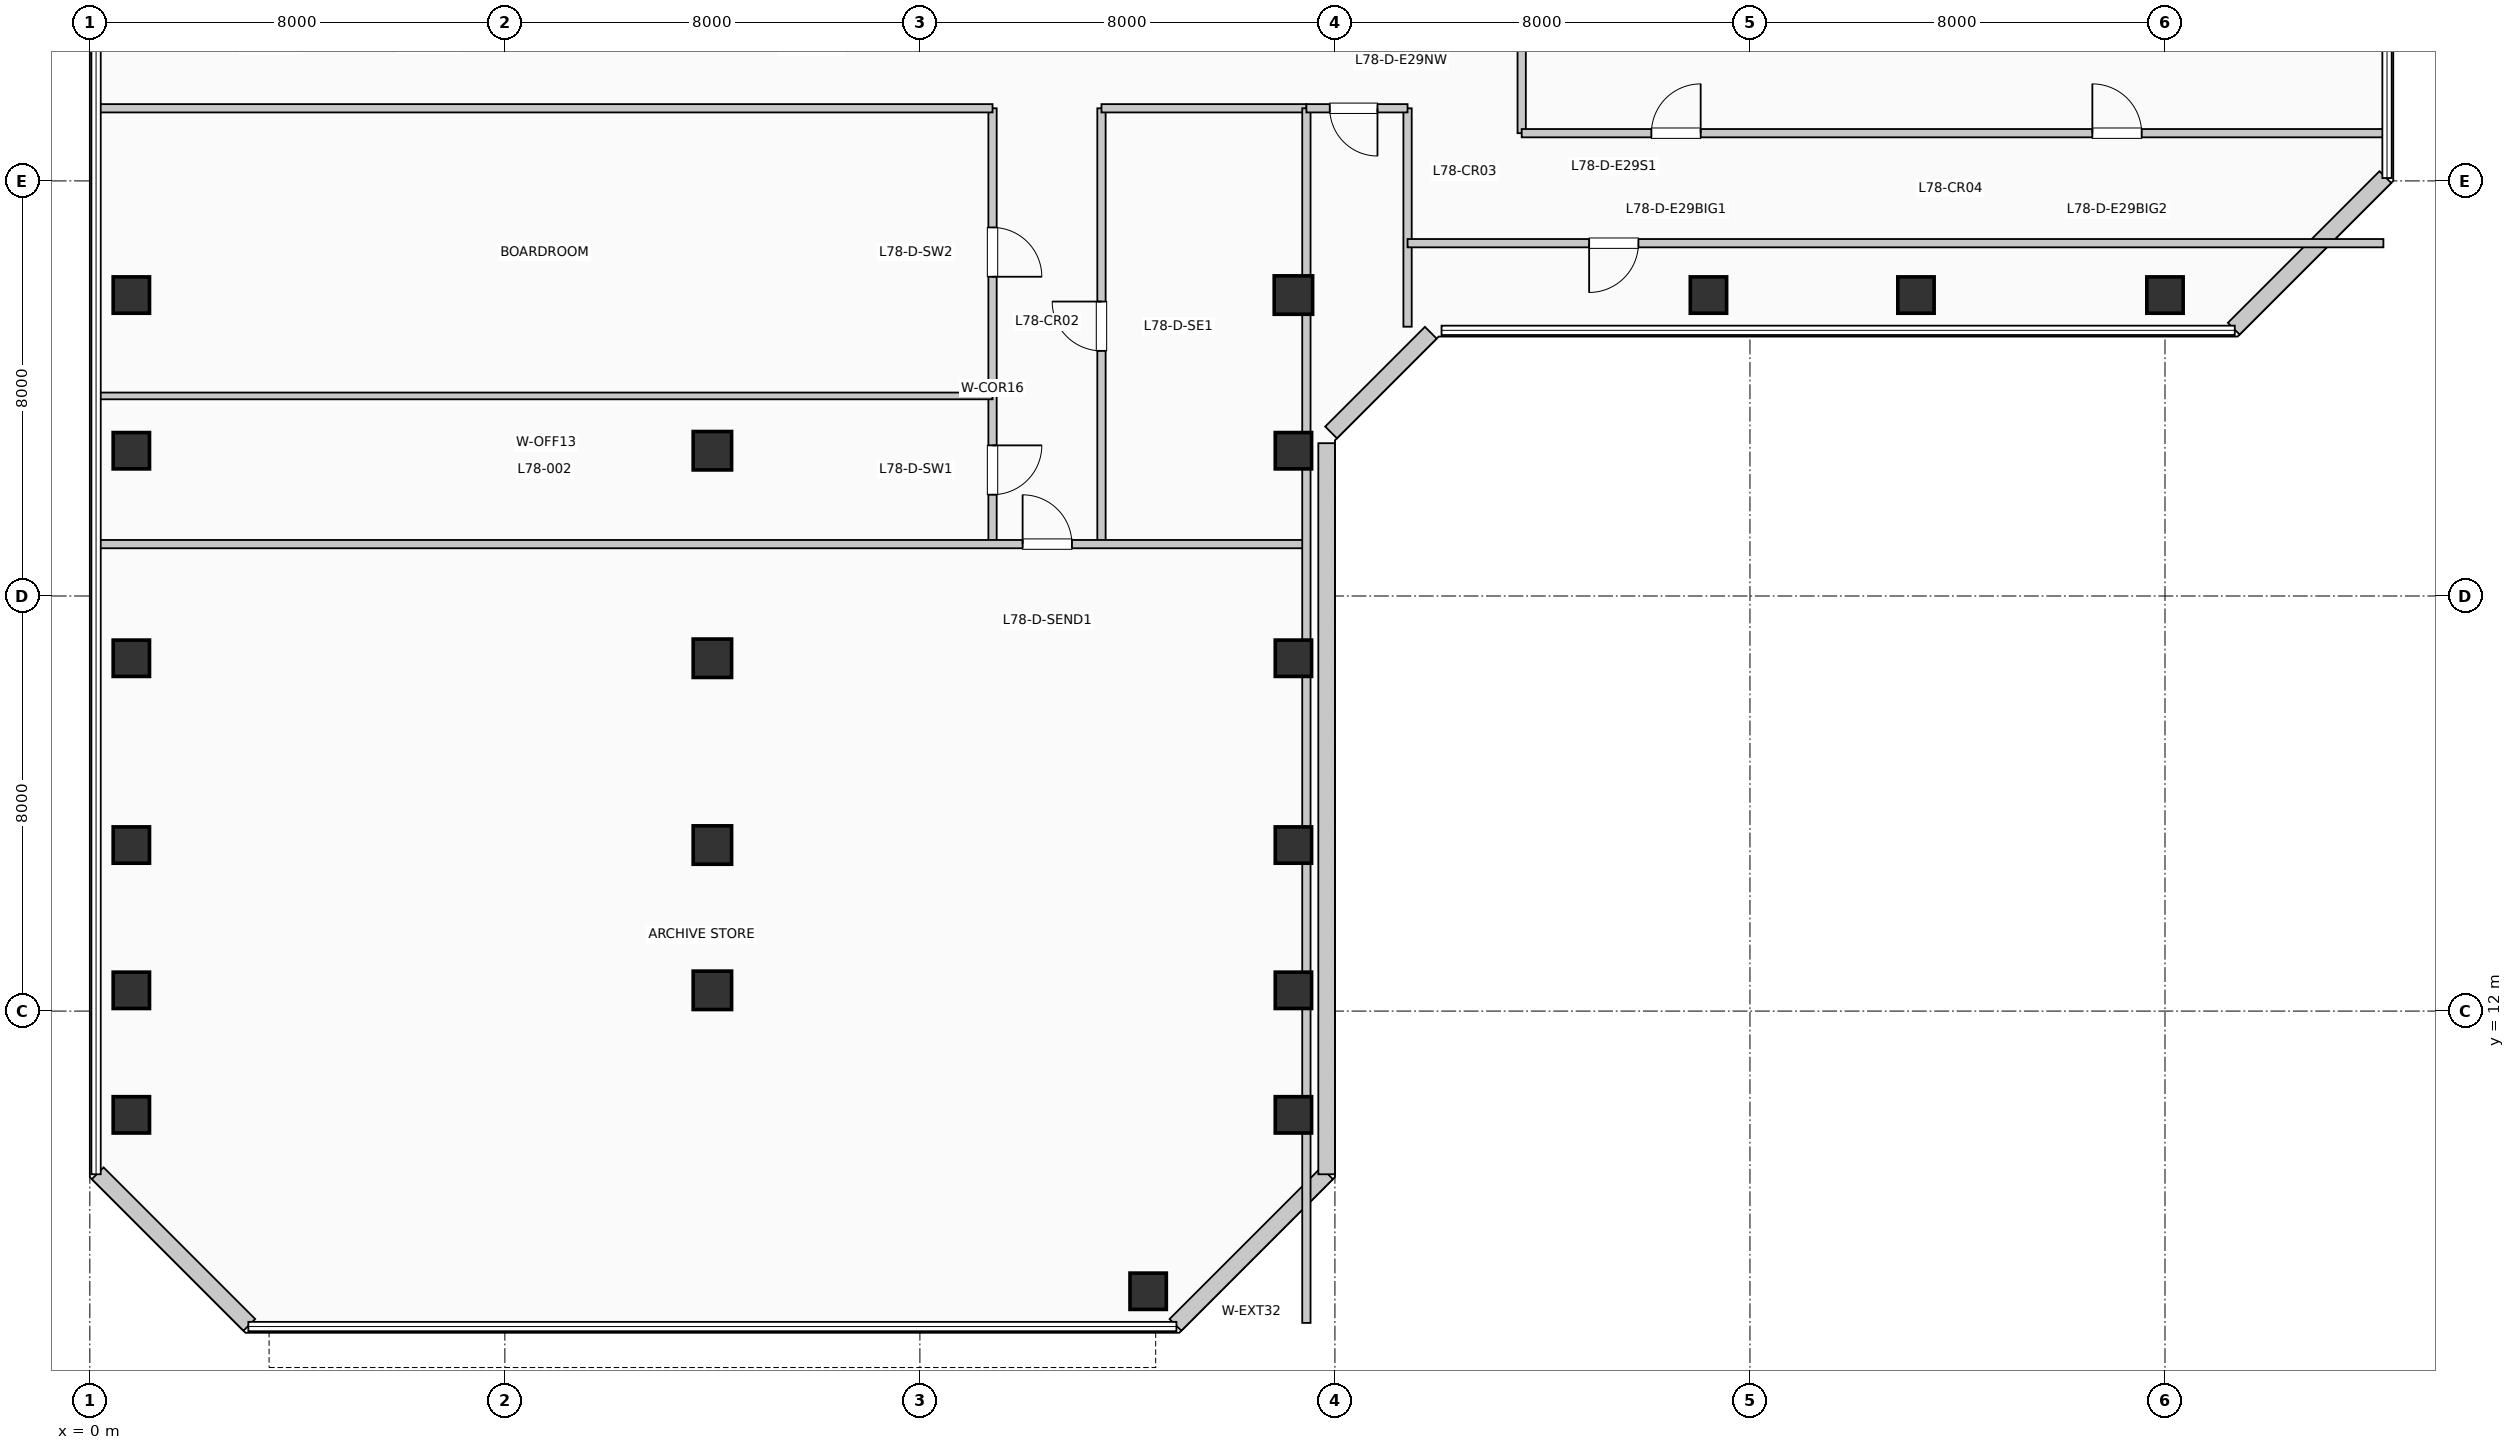
"""IFC4 building model, lengths in metres.
Left out: names, types, materials, properties, quantities, classifications, styles, units other than length and angle.
Written with IfcOpenShell. Run it as: python <this file> out.ifc"""

import sys

from ifc_helpers import new_model, si_unit, direction, frame, frame_2d, origin, origin_2d, place, context, subcontext, project, spatial, rectangle, extrude, element, fill, save


model = new_model("IFC4")
c1 = context("Model", 3, precision=1e-05, world=origin(), true_north=direction((0.0, 1.0)))
c2 = subcontext(c1, "Body", "Model", "MODEL_VIEW")
j1 = project(units=[si_unit("LENGTHUNIT", "METRE"), si_unit("PLANEANGLEUNIT", "RADIAN")], contexts=[c1])
p1 = place(None, origin())
s1 = spatial("IfcSite", under=j1, at=p1, CompositionType="ELEMENT")
p2 = place(p1, origin())
s2 = spatial("IfcBuilding", under=s1, at=p2, CompositionType="ELEMENT")
p3 = place(p2, frame((0.0, 0.0, 319.77)))
s3 = spatial("IfcBuildingStorey", under=s2, at=p3, CompositionType="ELEMENT", Elevation=319.77)
for number, where, z_axis, x_axis in (
    (1, (0.8, 10.0, 0.0), (0.0, 0.0, 1.0), (1.0, 0.0, 0.0)),
    (2, (0.8, 12.4, 0.0), (0.0, 0.0, 1.0), (1.0, 0.0, 0.0)),
    (3, (0.8, 15.2, 0.0), (0.0, 0.0, 1.0), (1.0, 0.0, 0.0)),
    (4, (0.8, 18.8, 0.0), (0.0, 0.0, 1.0), (1.0, 0.0, 0.0)),
    (5, (0.8, 22.8, 0.0), (0.0, 0.0, 1.0), (1.0, 0.0, 0.0)),
    (6, (0.8, 25.8, 0.0), (0.0, 0.0, 1.0), (1.0, 0.0, 0.0)),
):
    element("IfcColumn", number, at=place(p3, frame(where, z_axis=z_axis, x_axis=x_axis)), inside=s3, PredefinedType="COLUMN", context=c2, shape_type="SweptSolid", body=[
        extrude(rectangle(XDim=0.7, YDim=0.7, at=origin_2d()), origin(), (0.0, 0.0, 1.0), 3.96),
    ])
for number, where, z_axis, x_axis in (
    (7, (12.0, 12.4, 0.0), (0.0, 0.0, 1.0), (1.0, 0.0, 0.0)),
    (8, (12.0, 15.2, 0.0), (0.0, 0.0, 1.0), (1.0, 0.0, 0.0)),
    (9, (12.0, 18.8, 0.0), (0.0, 0.0, 1.0), (1.0, 0.0, 0.0)),
    (10, (12.0, 22.8, 0.0), (0.0, 0.0, 1.0), (1.0, 0.0, 0.0)),
):
    element("IfcColumn", number, at=place(p3, frame(where, z_axis=z_axis, x_axis=x_axis)), inside=s3, PredefinedType="COLUMN", context=c2, shape_type="SweptSolid", body=[
        extrude(rectangle(XDim=0.74, YDim=0.74, at=origin_2d()), origin(), (0.0, 0.0, 1.0), 3.96),
    ])
for number, where, z_axis, x_axis in (
    (11, (20.4, 6.6, 0.0), (0.0, 0.0, 1.0), (1.0, 0.0, 0.0)),
    (12, (23.2, 10.0, 0.0), (0.0, 0.0, 1.0), (1.0, 0.0, 0.0)),
    (13, (23.2, 12.4, 0.0), (0.0, 0.0, 1.0), (1.0, 0.0, 0.0)),
    (14, (23.2, 15.2, 0.0), (0.0, 0.0, 1.0), (1.0, 0.0, 0.0)),
    (15, (23.2, 18.8, 0.0), (0.0, 0.0, 1.0), (1.0, 0.0, 0.0)),
    (16, (23.2, 22.8, 0.0), (0.0, 0.0, 1.0), (1.0, 0.0, 0.0)),
):
    element("IfcColumn", number, at=place(p3, frame(where, z_axis=z_axis, x_axis=x_axis)), inside=s3, PredefinedType="COLUMN", context=c2, shape_type="SweptSolid", body=[
        extrude(rectangle(XDim=0.7, YDim=0.7, at=origin_2d()), origin(), (0.0, 0.0, 1.0), 3.96),
    ])
p4 = place(p3, frame((23.2, 25.8, 0.0), z_axis=(0.0, 0.0, 1.0), x_axis=(1.0, 0.0, 0.0)))
e17 = element("IfcColumn", 17, at=p4, inside=s3, PredefinedType="COLUMN", context=c2, shape_type="SweptSolid", body=[
    extrude(rectangle(XDim=0.74, YDim=0.74, at=origin_2d()), origin(), (0.0, 0.0, 1.0), 3.96),
])
for number, where, z_axis, x_axis in (
    (18, (31.2, 25.8, 0.0), (0.0, 0.0, 1.0), (1.0, 0.0, 0.0)),
    (19, (35.2, 25.8, 0.0), (0.0, 0.0, 1.0), (1.0, 0.0, 0.0)),
    (20, (40.0, 25.8, 0.0), (0.0, 0.0, 1.0), (1.0, 0.0, 0.0)),
):
    element("IfcColumn", number, at=place(p3, frame(where, z_axis=z_axis, x_axis=x_axis)), inside=s3, PredefinedType="COLUMN", context=c2, shape_type="SweptSolid", body=[
        extrude(rectangle(XDim=0.7, YDim=0.7, at=origin_2d()), origin(), (0.0, 0.0, 1.0), 3.96),
    ])
p5 = place(p3, frame((20.926, 5.952, 0.0), z_axis=(0.0, 0.0, 1.0), x_axis=(0.707077242712, 0.707136318428, 0.0)))
e21 = element("IfcWall", 21, at=p5, inside=s3, PredefinedType="SOLIDWALL", context=c2, shape_type="SweptSolid", body=[
    extrude(rectangle(XDim=4.133, YDim=0.32, at=frame_2d((2.066, 0.0))), origin(), (0.0, 0.0, 1.0), 3.74),
])
p6 = place(p3, frame((23.84, 8.855, 0.0), z_axis=(0.0, 0.0, 1.0), x_axis=(0.0, 1.0, 0.0)))
e22 = element("IfcWall", 22, at=p6, inside=s3, PredefinedType="SOLIDWALL", context=c2, shape_type="SweptSolid", body=[
    extrude(rectangle(XDim=14.09, YDim=0.32, at=frame_2d((7.045, 0.0))), origin(), (0.0, 0.0, 1.0), 3.74),
])
p7 = place(p3, frame((23.926, 23.152, 0.0), z_axis=(0.0, 0.0, 1.0), x_axis=(0.707106781187, 0.707106781187, 0.0)))
e23 = element("IfcWall", 23, at=p7, inside=s3, PredefinedType="SOLIDWALL", context=c2, shape_type="SweptSolid", body=[
    extrude(rectangle(XDim=2.718, YDim=0.32, at=frame_2d((1.359, 0.0))), origin(), (0.0, 0.0, 1.0), 3.74),
])
for number, where, z_axis, x_axis in (
    (24, (41.326, 25.152, 0.0), (0.0, 0.0, 1.0), (0.707, 0.707, 0.0)),
    (25, (0.152, 8.874, 0.0), (0.0, 0.0, 1.0), (0.707, -0.707, 0.0)),
):
    element("IfcWall", number, at=place(p3, frame(where, z_axis=z_axis, x_axis=x_axis)), inside=s3, PredefinedType="SOLIDWALL", context=c2, shape_type="SweptSolid", body=[
        extrude(rectangle(XDim=4.133, YDim=0.32, at=frame_2d((2.066, 0.0))), origin(), (0.0, 0.0, 1.0), 3.74),
    ])
p8 = place(p3, frame((17.4, 21.0, 0.0), z_axis=(0.0, 0.0, 1.0), x_axis=(0.0, 1.0, 0.0)))
e26 = element("IfcWall", 26, at=p8, inside=s3, PredefinedType="PARTITIONING", context=c2, shape_type="SweptSolid", body=[
    extrude(rectangle(XDim=8.4, YDim=0.16, at=frame_2d((4.2, 0.0))), origin(), (0.0, 0.0, 1.0), 3.74),
])
p9 = place(p8, frame((1.903, 0.0, 0.0), z_axis=(0.0, 0.0, 1.0), x_axis=(-1.0, 0.0, 0.0)))
e27 = element("IfcOpeningElement", 27, at=p9, cuts=e26, PredefinedType="OPENING", context=c2, shape_type="SweptSolid", body=[
    extrude(rectangle(XDim=0.95, YDim=2.15, at=frame_2d((0.475, 1.075))), frame((0.0, 0.09, 0.0), z_axis=(0.0, -1.0, 0.0), x_axis=(1.0, 0.0, 0.0)), (0.0, 0.0, 1.0), 0.18),
])
p10 = place(p8, frame((6.103, 0.0, 0.0), z_axis=(0.0, 0.0, 1.0), x_axis=(-1.0, 0.0, 0.0)))
e28 = element("IfcOpeningElement", 28, at=p10, cuts=e26, PredefinedType="OPENING", context=c2, shape_type="SweptSolid", body=[
    extrude(rectangle(XDim=0.95, YDim=2.15, at=frame_2d((0.475, 1.075))), frame((0.0, 0.09, 0.0), z_axis=(0.0, -1.0, 0.0), x_axis=(1.0, 0.0, 0.0)), (0.0, 0.0, 1.0), 0.18),
])
p11 = place(p3, frame((19.5, 21.0, 0.0), z_axis=(0.0, 0.0, 1.0), x_axis=(0.0, 1.0, 0.0)))
e29 = element("IfcWall", 29, at=p11, inside=s3, PredefinedType="PARTITIONING", context=c2, shape_type="SweptSolid", body=[
    extrude(rectangle(XDim=8.4, YDim=0.16, at=frame_2d((4.2, 0.0))), origin(), (0.0, 0.0, 1.0), 3.74),
])
p12 = place(p11, frame((3.725, 0.0, 0.0)))
e30 = element("IfcOpeningElement", 30, at=p12, cuts=e29, PredefinedType="OPENING", context=c2, shape_type="SweptSolid", body=[
    extrude(rectangle(XDim=0.95, YDim=2.15, at=frame_2d((0.475, 1.075))), frame((0.0, 0.09, 0.0), z_axis=(0.0, -1.0, 0.0), x_axis=(1.0, 0.0, 0.0)), (0.0, 0.0, 1.0), 0.18),
])
p13 = place(p3, frame((0.19, 21.0, 0.0), z_axis=(0.0, 0.0, 1.0), x_axis=(1.0, 0.0, 0.0)))
e31 = element("IfcWall", 31, at=p13, inside=s3, PredefinedType="PARTITIONING", context=c2, shape_type="SweptSolid", body=[
    extrude(rectangle(XDim=23.26, YDim=0.16, at=frame_2d((11.63, 0.0))), origin(), (0.0, 0.0, 1.0), 3.74),
])
p14 = place(p13, frame((17.79, 0.0, 0.0)))
e32 = element("IfcOpeningElement", 32, at=p14, cuts=e31, PredefinedType="OPENING", context=c2, shape_type="SweptSolid", body=[
    extrude(rectangle(XDim=0.95, YDim=2.15, at=frame_2d((0.475, 1.075))), frame((0.0, 0.09, 0.0), z_axis=(0.0, -1.0, 0.0), x_axis=(1.0, 0.0, 0.0)), (0.0, 0.0, 1.0), 0.18),
])
p15 = place(p3, frame((0.19, 29.4, 0.0), z_axis=(0.0, 0.0, 1.0), x_axis=(1.0, 0.0, 0.0)))
e33 = element("IfcWall", 33, at=p15, inside=s3, PredefinedType="PARTITIONING", context=c2, shape_type="SweptSolid", body=[
    extrude(rectangle(XDim=17.21, YDim=0.16, at=frame_2d((8.605, 0.0))), origin(), (0.0, 0.0, 1.0), 3.425),
])
p16 = place(p3, frame((19.5, 29.4, 0.0), z_axis=(0.0, 0.0, 1.0), x_axis=(1.0, 0.0, 0.0)))
e34 = element("IfcWall", 34, at=p16, inside=s3, PredefinedType="PARTITIONING", context=c2, shape_type="SweptSolid", body=[
    extrude(rectangle(XDim=3.95, YDim=0.16, at=frame_2d((1.975, 0.0))), origin(), (0.0, 0.0, 1.0), 3.425),
])
p17 = place(p3, frame((23.45, 5.99, 0.0), z_axis=(0.0, 0.0, 1.0), x_axis=(0.0, 1.0, 0.0)))
e35 = element("IfcWall", 35, at=p17, inside=s3, PredefinedType="PARTITIONING", context=c2, shape_type="SweptSolid", body=[
    extrude(rectangle(XDim=23.41, YDim=0.16, at=frame_2d((11.705, 0.0))), origin(), (0.0, 0.0, 1.0), 3.175),
])
p18 = place(p3, frame((0.19, 23.856, 0.0), z_axis=(0.0, 0.0, 1.0), x_axis=(1.0, 0.0, 0.0)))
e36 = element("IfcWall", 36, at=p18, inside=s3, PredefinedType="PARTITIONING", context=c2, shape_type="SweptSolid", body=[
    extrude(rectangle(XDim=17.21, YDim=0.13, at=frame_2d((8.605, 0.0))), origin(), (0.0, 0.0, 1.0), 3.74),
])
p19 = place(p3, frame((25.4, 25.19, 0.0), z_axis=(0.0, 0.0, 1.0), x_axis=(0.0, 1.0, 0.0)))
e37 = element("IfcWall", 37, at=p19, inside=s3, PredefinedType="PARTITIONING", context=c2, shape_type="SweptSolid", body=[
    extrude(rectangle(XDim=4.21, YDim=0.16, at=frame_2d((2.105, 0.0))), origin(), (0.0, 0.0, 1.0), 3.74),
])
p20 = place(p3, frame((27.6, 28.92, 0.0), z_axis=(0.0, 0.0, 1.0), x_axis=(0.0, 1.0, 0.0)))
e38 = element("IfcWall", 38, at=p20, inside=s3, PredefinedType="PARTITIONING", context=c2, shape_type="SweptSolid", body=[
    extrude(rectangle(XDim=16.89, YDim=0.16, at=frame_2d((8.445, 0.0))), origin(), (0.0, 0.0, 1.0), 3.74),
])
p21 = place(p3, frame((25.4, 26.8, 0.0), z_axis=(0.0, 0.0, 1.0), x_axis=(1.0, 0.0, 0.0)))
e39 = element("IfcWall", 39, at=p21, inside=s3, PredefinedType="PARTITIONING", context=c2, shape_type="SweptSolid", body=[
    extrude(rectangle(XDim=18.81, YDim=0.16, at=frame_2d((9.405, 0.0))), origin(), (0.0, 0.0, 1.0), 3.74),
])
p22 = place(p21, frame((4.45, 0.0, 0.0), z_axis=(0.0, 0.0, 1.0), x_axis=(-1.0, 0.0, 0.0)))
e40 = element("IfcOpeningElement", 40, at=p22, cuts=e39, PredefinedType="OPENING", context=c2, shape_type="SweptSolid", body=[
    extrude(rectangle(XDim=0.95, YDim=2.15, at=frame_2d((0.475, 1.075))), frame((0.0, 0.09, 0.0), z_axis=(0.0, -1.0, 0.0), x_axis=(1.0, 0.0, 0.0)), (0.0, 0.0, 1.0), 0.18),
])
p23 = place(p3, frame((27.6, 28.92, 0.0), z_axis=(0.0, 0.0, 1.0), x_axis=(1.0, 0.0, 0.0)))
e41 = element("IfcWall", 41, at=p23, inside=s3, PredefinedType="PARTITIONING", context=c2, shape_type="SweptSolid", body=[
    extrude(rectangle(XDim=16.61, YDim=0.16, at=frame_2d((8.305, 0.0))), origin(), (0.0, 0.0, 1.0), 3.74),
])
p24 = place(p23, frame((2.5, 0.0, 0.0)))
e42 = element("IfcOpeningElement", 42, at=p24, cuts=e41, PredefinedType="OPENING", context=c2, shape_type="SweptSolid", body=[
    extrude(rectangle(XDim=0.95, YDim=2.15, at=frame_2d((0.475, 1.075))), frame((0.0, 0.09, 0.0), z_axis=(0.0, -1.0, 0.0), x_axis=(1.0, 0.0, 0.0)), (0.0, 0.0, 1.0), 0.18),
])
p25 = place(p23, frame((11.0, 0.0, 0.0)))
e43 = element("IfcOpeningElement", 43, at=p25, cuts=e41, PredefinedType="OPENING", context=c2, shape_type="SweptSolid", body=[
    extrude(rectangle(XDim=0.95, YDim=2.15, at=frame_2d((0.475, 1.075))), frame((0.0, 0.09, 0.0), z_axis=(0.0, -1.0, 0.0), x_axis=(1.0, 0.0, 0.0)), (0.0, 0.0, 1.0), 0.18),
])
p26 = place(p3, frame((23.45, 29.4, 0.0), z_axis=(0.0, 0.0, 1.0), x_axis=(1.0, 0.0, 0.0)))
e44 = element("IfcWall", 44, at=p26, inside=s3, PredefinedType="PARTITIONING", context=c2, shape_type="SweptSolid", body=[
    extrude(rectangle(XDim=1.95, YDim=0.16, at=frame_2d((0.975, 0.0))), origin(), (0.0, 0.0, 1.0), 3.425),
])
p27 = place(p26, frame((1.37, 0.0, 0.0), z_axis=(0.0, 0.0, 1.0), x_axis=(-1.0, 0.0, 0.0)))
e45 = element("IfcOpeningElement", 45, at=p27, cuts=e44, PredefinedType="OPENING", context=c2, shape_type="SweptSolid", body=[
    extrude(rectangle(XDim=0.92, YDim=2.1, at=frame_2d((0.46, 1.05))), frame((0.0, 0.09, 0.0), z_axis=(0.0, -1.0, 0.0), x_axis=(1.0, 0.0, 0.0)), (0.0, 0.0, 1.0), 0.18),
])
p28 = place(p14, origin())
e46 = element("IfcDoor", 46, at=p28, inside=s3, OperationType="SINGLE_SWING_LEFT", PredefinedType="DOOR", context=c2, shape_type="SweptSolid", body=[
    extrude(rectangle(XDim=0.95, YDim=2.15, at=frame_2d((0.475, 1.075))), frame((0.0, 0.025, 0.0), z_axis=(0.0, -1.0, 0.0), x_axis=(1.0, 0.0, 0.0)), (0.0, 0.0, 1.0), 0.05),
])
fill(e32, e46)
p29 = place(p9, origin())
e47 = element("IfcDoor", 47, at=p29, inside=s3, OperationType="SINGLE_SWING_RIGHT", PredefinedType="DOOR", context=c2, shape_type="SweptSolid", body=[
    extrude(rectangle(XDim=0.95, YDim=2.15, at=frame_2d((0.475, 1.075))), frame((0.0, 0.025, 0.0), z_axis=(0.0, -1.0, 0.0), x_axis=(1.0, 0.0, 0.0)), (0.0, 0.0, 1.0), 0.05),
])
fill(e27, e47)
p30 = place(p10, origin())
e48 = element("IfcDoor", 48, at=p30, inside=s3, OperationType="SINGLE_SWING_LEFT", PredefinedType="DOOR", context=c2, shape_type="SweptSolid", body=[
    extrude(rectangle(XDim=0.95, YDim=2.15, at=frame_2d((0.475, 1.075))), frame((0.0, 0.025, 0.0), z_axis=(0.0, -1.0, 0.0), x_axis=(1.0, 0.0, 0.0)), (0.0, 0.0, 1.0), 0.05),
])
fill(e28, e48)
p31 = place(p12, origin())
e49 = element("IfcDoor", 49, at=p31, inside=s3, OperationType="SINGLE_SWING_RIGHT", PredefinedType="DOOR", context=c2, shape_type="SweptSolid", body=[
    extrude(rectangle(XDim=0.95, YDim=2.15, at=frame_2d((0.475, 1.075))), frame((0.0, 0.025, 0.0), z_axis=(0.0, -1.0, 0.0), x_axis=(1.0, 0.0, 0.0)), (0.0, 0.0, 1.0), 0.05),
])
fill(e30, e49)
p32 = place(p24, origin())
e50 = element("IfcDoor", 50, at=p32, inside=s3, OperationType="SINGLE_SWING_RIGHT", PredefinedType="DOOR", context=c2, shape_type="SweptSolid", body=[
    extrude(rectangle(XDim=0.95, YDim=2.15, at=frame_2d((0.475, 1.075))), frame((0.0, 0.025, 0.0), z_axis=(0.0, -1.0, 0.0), x_axis=(1.0, 0.0, 0.0)), (0.0, 0.0, 1.0), 0.05),
])
fill(e42, e50)
p33 = place(p25, origin())
e51 = element("IfcDoor", 51, at=p33, inside=s3, OperationType="SINGLE_SWING_LEFT", PredefinedType="DOOR", context=c2, shape_type="SweptSolid", body=[
    extrude(rectangle(XDim=0.95, YDim=2.15, at=frame_2d((0.475, 1.075))), frame((0.0, 0.025, 0.0), z_axis=(0.0, -1.0, 0.0), x_axis=(1.0, 0.0, 0.0)), (0.0, 0.0, 1.0), 0.05),
])
fill(e43, e51)
p34 = place(p27, origin())
e52 = element("IfcDoor", 52, at=p34, inside=s3, OperationType="SINGLE_SWING_RIGHT", PredefinedType="DOOR", context=c2, shape_type="SweptSolid", body=[
    extrude(rectangle(XDim=0.92, YDim=2.1, at=frame_2d((0.46, 1.05))), frame((0.0, 0.025, 0.0), z_axis=(0.0, -1.0, 0.0), x_axis=(1.0, 0.0, 0.0)), (0.0, 0.0, 1.0), 0.05),
])
fill(e45, e52)
p35 = place(p22, origin())
e53 = element("IfcDoor", 53, at=p35, inside=s3, OperationType="SINGLE_SWING_LEFT", PredefinedType="DOOR", context=c2, shape_type="SweptSolid", body=[
    extrude(rectangle(XDim=0.95, YDim=2.15, at=frame_2d((0.475, 1.075))), frame((0.0, 0.025, 0.0), z_axis=(0.0, -1.0, 0.0), x_axis=(1.0, 0.0, 0.0)), (0.0, 0.0, 1.0), 0.05),
])
fill(e40, e53)
save(model, sys.argv[1])
